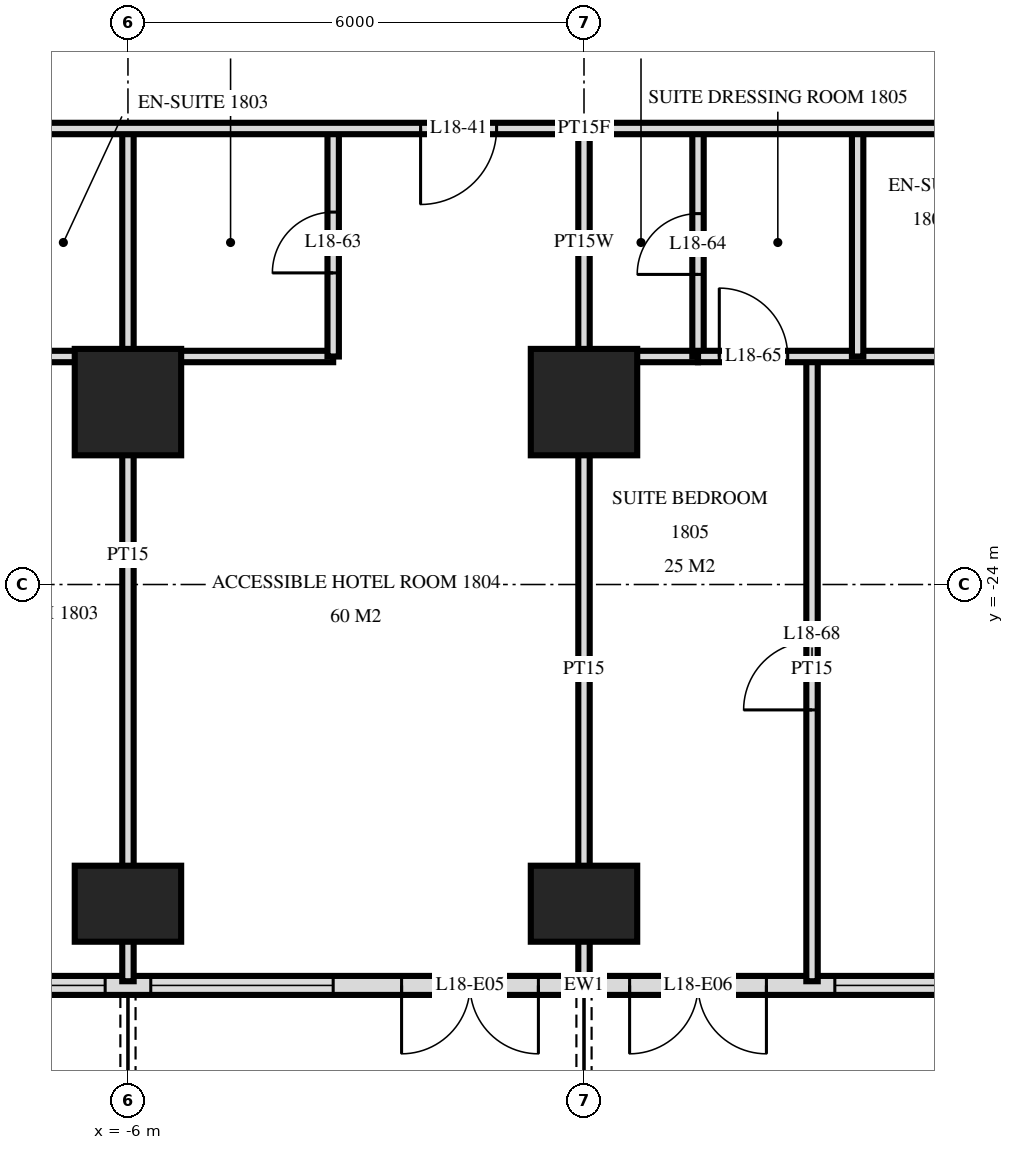
"""IFC4 building model, lengths in metres.
Left out: names, types, materials, properties, quantities, classifications, styles, units other than length and angle.
Written with IfcOpenShell. Run it as: python <this file> out.ifc"""

import sys

from ifc_helpers import new_model, si_unit, direction, frame, frame_2d, origin, origin_2d, place, context, subcontext, project, spatial, rectangle, extrude, element, fill, save


model = new_model("IFC4")
c1 = context("Model", 3, precision=1e-05, world=origin(), true_north=direction((0.0, 1.0)))
c2 = subcontext(c1, "Body", "Model", "MODEL_VIEW")
j1 = project(units=[si_unit("LENGTHUNIT", "METRE"), si_unit("PLANEANGLEUNIT", "RADIAN")], contexts=[c1])
p1 = place(None, origin())
s1 = spatial("IfcSite", under=j1, at=p1, CompositionType="ELEMENT")
p2 = place(p1, origin())
s2 = spatial("IfcBuilding", under=s1, at=p2, CompositionType="ELEMENT")
p3 = place(p2, frame((0.0, 0.0, 74.4)))
s3 = spatial("IfcBuildingStorey", under=s2, at=p3, CompositionType="ELEMENT", Elevation=74.4)
p4 = place(p3, frame((-6.0, -28.2, 0.0), z_axis=(0.0, 0.0, 1.0), x_axis=(1.0, 0.0, 0.0)))
e1 = element("IfcColumn", 1, at=p4, inside=s3, PredefinedType="COLUMN", context=c2, shape_type="SweptSolid", body=[
    extrude(rectangle(XDim=1.4, YDim=1.0, at=origin_2d()), origin(), (0.0, 0.0, 1.0), 3.6),
])
p5 = place(p3, frame((-6.0, -21.6, 0.0), z_axis=(0.0, 0.0, 1.0), x_axis=(1.0, 0.0, 0.0)))
e2 = element("IfcColumn", 2, at=p5, inside=s3, PredefinedType="COLUMN", context=c2, shape_type="SweptSolid", body=[
    extrude(rectangle(XDim=1.4, YDim=1.4, at=origin_2d()), origin(), (0.0, 0.0, 1.0), 3.6),
])
p6 = place(p3, frame((0.0, -28.2, 0.0), z_axis=(0.0, 0.0, 1.0), x_axis=(1.0, 0.0, 0.0)))
e3 = element("IfcColumn", 3, at=p6, inside=s3, PredefinedType="COLUMN", context=c2, shape_type="SweptSolid", body=[
    extrude(rectangle(XDim=1.4, YDim=1.0, at=origin_2d()), origin(), (0.0, 0.0, 1.0), 3.6),
])
p7 = place(p3, frame((0.0, -21.6, 0.0), z_axis=(0.0, 0.0, 1.0), x_axis=(1.0, 0.0, 0.0)))
e4 = element("IfcColumn", 4, at=p7, inside=s3, PredefinedType="COLUMN", context=c2, shape_type="SweptSolid", body=[
    extrude(rectangle(XDim=1.4, YDim=1.4, at=origin_2d()), origin(), (0.0, 0.0, 1.0), 3.6),
])
p8 = place(p3, frame((-28.775, -29.275, 0.0), z_axis=(0.0, 0.0, 1.0), x_axis=(1.0, 0.0, 0.0)))
e5 = element("IfcWall", 5, at=p8, inside=s3, PredefinedType="SOLIDWALL", context=c2, shape_type="SweptSolid", body=[
    extrude(rectangle(XDim=57.551, YDim=0.25, at=frame_2d((28.775, 0.0))), origin(), (0.0, 0.0, 1.0), 3.32),
])
p9 = place(p8, frame((0.575, 0.0, 0.0)))
e6 = element("IfcOpeningElement", 6, at=p9, cuts=e5, PredefinedType="OPENING", context=c2, shape_type="SweptSolid", body=[
    extrude(rectangle(XDim=1.8, YDim=2.4, at=frame_2d((0.9, 1.2))), frame((0.0, 0.135, 0.0), z_axis=(0.0, -1.0, 0.0), x_axis=(1.0, 0.0, 0.0)), (0.0, 0.0, 1.0), 0.27),
])
p10 = place(p8, frame((5.075, 0.0, 0.3)))
e7 = element("IfcOpeningElement", 7, at=p10, cuts=e5, PredefinedType="OPENING", context=c2, shape_type="SweptSolid", body=[
    extrude(rectangle(XDim=2.4, YDim=2.1, at=frame_2d((1.2, 1.05))), frame((0.0, 0.135, 0.0), z_axis=(0.0, -1.0, 0.0), x_axis=(1.0, 0.0, 0.0)), (0.0, 0.0, 1.0), 0.27),
])
p11 = place(p8, frame((8.375, 0.0, 0.0)))
e8 = element("IfcOpeningElement", 8, at=p11, cuts=e5, PredefinedType="OPENING", context=c2, shape_type="SweptSolid", body=[
    extrude(rectangle(XDim=1.8, YDim=2.4, at=frame_2d((0.9, 1.2))), frame((0.0, 0.135, 0.0), z_axis=(0.0, -1.0, 0.0), x_axis=(1.0, 0.0, 0.0)), (0.0, 0.0, 1.0), 0.27),
])
p12 = place(p8, frame((11.375, 0.0, 0.0)))
e9 = element("IfcOpeningElement", 9, at=p12, cuts=e5, PredefinedType="OPENING", context=c2, shape_type="SweptSolid", body=[
    extrude(rectangle(XDim=1.8, YDim=2.4, at=frame_2d((0.9, 1.2))), frame((0.0, 0.135, 0.0), z_axis=(0.0, -1.0, 0.0), x_axis=(1.0, 0.0, 0.0)), (0.0, 0.0, 1.0), 0.27),
])
p13 = place(p8, frame((14.075, 0.0, 0.3)))
e10 = element("IfcOpeningElement", 10, at=p13, cuts=e5, PredefinedType="OPENING", context=c2, shape_type="SweptSolid", body=[
    extrude(rectangle(XDim=2.4, YDim=2.1, at=frame_2d((1.2, 1.05))), frame((0.0, 0.135, 0.0), z_axis=(0.0, -1.0, 0.0), x_axis=(1.0, 0.0, 0.0)), (0.0, 0.0, 1.0), 0.27),
])
p14 = place(p8, frame((17.375, 0.0, 0.0)))
e11 = element("IfcOpeningElement", 11, at=p14, cuts=e5, PredefinedType="OPENING", context=c2, shape_type="SweptSolid", body=[
    extrude(rectangle(XDim=1.8, YDim=2.4, at=frame_2d((0.9, 1.2))), frame((0.0, 0.135, 0.0), z_axis=(0.0, -1.0, 0.0), x_axis=(1.0, 0.0, 0.0)), (0.0, 0.0, 1.0), 0.27),
])
p15 = place(p8, frame((20.075, 0.0, 0.3)))
e12 = element("IfcOpeningElement", 12, at=p15, cuts=e5, PredefinedType="OPENING", context=c2, shape_type="SweptSolid", body=[
    extrude(rectangle(XDim=2.4, YDim=2.1, at=frame_2d((1.2, 1.05))), frame((0.0, 0.135, 0.0), z_axis=(0.0, -1.0, 0.0), x_axis=(1.0, 0.0, 0.0)), (0.0, 0.0, 1.0), 0.27),
])
p16 = place(p8, frame((23.075, 0.0, 0.3)))
e13 = element("IfcOpeningElement", 13, at=p16, cuts=e5, PredefinedType="OPENING", context=c2, shape_type="SweptSolid", body=[
    extrude(rectangle(XDim=2.4, YDim=2.1, at=frame_2d((1.2, 1.05))), frame((0.0, 0.135, 0.0), z_axis=(0.0, -1.0, 0.0), x_axis=(1.0, 0.0, 0.0)), (0.0, 0.0, 1.0), 0.27),
])
p17 = place(p8, frame((26.375, 0.0, 0.0)))
e14 = element("IfcOpeningElement", 14, at=p17, cuts=e5, PredefinedType="OPENING", context=c2, shape_type="SweptSolid", body=[
    extrude(rectangle(XDim=1.8, YDim=2.4, at=frame_2d((0.9, 1.2))), frame((0.0, 0.135, 0.0), z_axis=(0.0, -1.0, 0.0), x_axis=(1.0, 0.0, 0.0)), (0.0, 0.0, 1.0), 0.27),
])
p18 = place(p8, frame((29.375, 0.0, 0.0)))
e15 = element("IfcOpeningElement", 15, at=p18, cuts=e5, PredefinedType="OPENING", context=c2, shape_type="SweptSolid", body=[
    extrude(rectangle(XDim=1.8, YDim=2.4, at=frame_2d((0.9, 1.2))), frame((0.0, 0.135, 0.0), z_axis=(0.0, -1.0, 0.0), x_axis=(1.0, 0.0, 0.0)), (0.0, 0.0, 1.0), 0.27),
])
p19 = place(p8, frame((32.075, 0.0, 0.3)))
e16 = element("IfcOpeningElement", 16, at=p19, cuts=e5, PredefinedType="OPENING", context=c2, shape_type="SweptSolid", body=[
    extrude(rectangle(XDim=2.4, YDim=2.1, at=frame_2d((1.2, 1.05))), frame((0.0, 0.135, 0.0), z_axis=(0.0, -1.0, 0.0), x_axis=(1.0, 0.0, 0.0)), (0.0, 0.0, 1.0), 0.27),
])
p20 = place(p8, frame((35.375, 0.0, 0.0)))
e17 = element("IfcOpeningElement", 17, at=p20, cuts=e5, PredefinedType="OPENING", context=c2, shape_type="SweptSolid", body=[
    extrude(rectangle(XDim=1.8, YDim=2.4, at=frame_2d((0.9, 1.2))), frame((0.0, 0.135, 0.0), z_axis=(0.0, -1.0, 0.0), x_axis=(1.0, 0.0, 0.0)), (0.0, 0.0, 1.0), 0.27),
])
p21 = place(p8, frame((38.075, 0.0, 0.3)))
e18 = element("IfcOpeningElement", 18, at=p21, cuts=e5, PredefinedType="OPENING", context=c2, shape_type="SweptSolid", body=[
    extrude(rectangle(XDim=2.4, YDim=2.1, at=frame_2d((1.2, 1.05))), frame((0.0, 0.135, 0.0), z_axis=(0.0, -1.0, 0.0), x_axis=(1.0, 0.0, 0.0)), (0.0, 0.0, 1.0), 0.27),
])
p22 = place(p8, frame((41.075, 0.0, 0.3)))
e19 = element("IfcOpeningElement", 19, at=p22, cuts=e5, PredefinedType="OPENING", context=c2, shape_type="SweptSolid", body=[
    extrude(rectangle(XDim=2.4, YDim=2.1, at=frame_2d((1.2, 1.05))), frame((0.0, 0.135, 0.0), z_axis=(0.0, -1.0, 0.0), x_axis=(1.0, 0.0, 0.0)), (0.0, 0.0, 1.0), 0.27),
])
p23 = place(p8, frame((44.375, 0.0, 0.0)))
e20 = element("IfcOpeningElement", 20, at=p23, cuts=e5, PredefinedType="OPENING", context=c2, shape_type="SweptSolid", body=[
    extrude(rectangle(XDim=1.8, YDim=2.4, at=frame_2d((0.9, 1.2))), frame((0.0, 0.135, 0.0), z_axis=(0.0, -1.0, 0.0), x_axis=(1.0, 0.0, 0.0)), (0.0, 0.0, 1.0), 0.27),
])
p24 = place(p8, frame((47.075, 0.0, 0.3)))
e21 = element("IfcOpeningElement", 21, at=p24, cuts=e5, PredefinedType="OPENING", context=c2, shape_type="SweptSolid", body=[
    extrude(rectangle(XDim=2.4, YDim=2.1, at=frame_2d((1.2, 1.05))), frame((0.0, 0.135, 0.0), z_axis=(0.0, -1.0, 0.0), x_axis=(1.0, 0.0, 0.0)), (0.0, 0.0, 1.0), 0.27),
])
p25 = place(p8, frame((50.375, 0.0, 0.0)))
e22 = element("IfcOpeningElement", 22, at=p25, cuts=e5, PredefinedType="OPENING", context=c2, shape_type="SweptSolid", body=[
    extrude(rectangle(XDim=1.8, YDim=2.4, at=frame_2d((0.9, 1.2))), frame((0.0, 0.135, 0.0), z_axis=(0.0, -1.0, 0.0), x_axis=(1.0, 0.0, 0.0)), (0.0, 0.0, 1.0), 0.27),
])
p26 = place(p8, frame((53.375, 0.0, 0.0)))
e23 = element("IfcOpeningElement", 23, at=p26, cuts=e5, PredefinedType="OPENING", context=c2, shape_type="SweptSolid", body=[
    extrude(rectangle(XDim=1.8, YDim=2.4, at=frame_2d((0.9, 1.2))), frame((0.0, 0.135, 0.0), z_axis=(0.0, -1.0, 0.0), x_axis=(1.0, 0.0, 0.0)), (0.0, 0.0, 1.0), 0.27),
])
p27 = place(p3, frame((3.6, -21.0, 0.0), z_axis=(0.0, 0.0, 1.0), x_axis=(0.0, 1.0, 0.0)))
e24 = element("IfcWall", 24, at=p27, inside=s3, PredefinedType="PARTITIONING", context=c2, shape_type="SweptSolid", body=[
    extrude(rectangle(XDim=3.0, YDim=0.15, at=frame_2d((1.5, 0.0))), origin(), (0.0, 0.0, 1.0), 3.32),
])
p28 = place(p3, frame((3.0, -29.22, 0.0), z_axis=(0.0, 0.0, 1.0), x_axis=(0.0, 1.0, 0.0)))
e25 = element("IfcWall", 25, at=p28, inside=s3, PredefinedType="PARTITIONING", context=c2, shape_type="SweptSolid", body=[
    extrude(rectangle(XDim=8.22, YDim=0.15, at=frame_2d((4.11, 0.0))), origin(), (0.0, 0.0, 1.0), 3.32),
])
p29 = place(p28, frame((3.57, 0.0, 0.0)))
e26 = element("IfcOpeningElement", 26, at=p29, cuts=e25, PredefinedType="OPENING", context=c2, shape_type="SweptSolid", body=[
    extrude(rectangle(XDim=0.9, YDim=2.1, at=frame_2d((0.45, 1.05))), frame((0.0, 0.085, 0.0), z_axis=(0.0, -1.0, 0.0), x_axis=(1.0, 0.0, 0.0)), (0.0, 0.0, 1.0), 0.17),
])
p30 = place(p3, frame((1.5, -21.0, 0.0), z_axis=(0.0, 0.0, 1.0), x_axis=(0.0, 1.0, 0.0)))
e27 = element("IfcWall", 27, at=p30, inside=s3, PredefinedType="PLUMBINGWALL", context=c2, shape_type="SweptSolid", body=[
    extrude(rectangle(XDim=3.0, YDim=0.15, at=frame_2d((1.5, 0.0))), origin(), (0.0, 0.0, 1.0), 3.32),
])
p31 = place(p30, frame((1.08, 0.0, 0.0)))
e28 = element("IfcOpeningElement", 28, at=p31, cuts=e27, PredefinedType="OPENING", context=c2, shape_type="SweptSolid", body=[
    extrude(rectangle(XDim=0.8, YDim=2.1, at=frame_2d((0.4, 1.05))), frame((0.0, 0.085, 0.0), z_axis=(0.0, -1.0, 0.0), x_axis=(1.0, 0.0, 0.0)), (0.0, 0.0, 1.0), 0.17),
])
p32 = place(p3, frame((0.0, -29.22, 0.0), z_axis=(0.0, 0.0, 1.0), x_axis=(0.0, 1.0, 0.0)))
e29 = element("IfcWall", 29, at=p32, inside=s3, PredefinedType="PARTITIONING", context=c2, shape_type="SweptSolid", body=[
    extrude(rectangle(XDim=8.22, YDim=0.15, at=frame_2d((4.11, 0.0))), origin(), (0.0, 0.0, 1.0), 3.32),
])
p33 = place(p3, frame((0.0, -21.0, 0.0), z_axis=(0.0, 0.0, 1.0), x_axis=(0.0, 1.0, 0.0)))
e30 = element("IfcWall", 30, at=p33, inside=s3, PredefinedType="PLUMBINGWALL", context=c2, shape_type="SweptSolid", body=[
    extrude(rectangle(XDim=3.0, YDim=0.15, at=frame_2d((1.5, 0.0))), origin(), (0.0, 0.0, 1.0), 3.32),
])
p34 = place(p3, frame((-3.3, -21.0, 0.0), z_axis=(0.0, 0.0, 1.0), x_axis=(0.0, 1.0, 0.0)))
e31 = element("IfcWall", 31, at=p34, inside=s3, PredefinedType="PARTITIONING", context=c2, shape_type="SweptSolid", body=[
    extrude(rectangle(XDim=3.0, YDim=0.15, at=frame_2d((1.5, 0.0))), origin(), (0.0, 0.0, 1.0), 3.32),
])
p35 = place(p34, frame((1.1, 0.0, 0.0)))
e32 = element("IfcOpeningElement", 32, at=p35, cuts=e31, PredefinedType="OPENING", context=c2, shape_type="SweptSolid", body=[
    extrude(rectangle(XDim=0.8, YDim=2.1, at=frame_2d((0.4, 1.05))), frame((0.0, 0.085, 0.0), z_axis=(0.0, -1.0, 0.0), x_axis=(1.0, 0.0, 0.0)), (0.0, 0.0, 1.0), 0.17),
])
p36 = place(p3, frame((-6.0, -29.22, 0.0), z_axis=(0.0, 0.0, 1.0), x_axis=(0.0, 1.0, 0.0)))
e33 = element("IfcWall", 33, at=p36, inside=s3, PredefinedType="PARTITIONING", context=c2, shape_type="SweptSolid", body=[
    extrude(rectangle(XDim=11.22, YDim=0.15, at=frame_2d((5.61, 0.0))), origin(), (0.0, 0.0, 1.0), 3.32),
])
p37 = place(p3, frame((-7.7, -21.0, 0.0), z_axis=(0.0, 0.0, 1.0), x_axis=(1.0, 0.0, 0.0)))
e34 = element("IfcWall", 34, at=p37, inside=s3, PredefinedType="PARTITIONING", context=c2, shape_type="SweptSolid", body=[
    extrude(rectangle(XDim=4.4, YDim=0.15, at=frame_2d((2.2, 0.0))), origin(), (0.0, 0.0, 1.0), 3.32),
])
p38 = place(p3, frame((1.5, -21.0, 0.0), z_axis=(0.0, 0.0, 1.0), x_axis=(1.0, 0.0, 0.0)))
e35 = element("IfcWall", 35, at=p38, inside=s3, PredefinedType="PARTITIONING", context=c2, shape_type="SweptSolid", body=[
    extrude(rectangle(XDim=5.1, YDim=0.15, at=frame_2d((2.55, 0.0))), origin(), (0.0, 0.0, 1.0), 3.32),
])
p39 = place(p38, frame((0.28, 0.0, 0.0)))
e36 = element("IfcOpeningElement", 36, at=p39, cuts=e35, PredefinedType="OPENING", context=c2, shape_type="SweptSolid", body=[
    extrude(rectangle(XDim=0.9, YDim=2.1, at=frame_2d((0.45, 1.05))), frame((0.0, 0.085, 0.0), z_axis=(0.0, -1.0, 0.0), x_axis=(1.0, 0.0, 0.0)), (0.0, 0.0, 1.0), 0.17),
])
p40 = place(p3, frame((0.0, -21.0, 0.0), z_axis=(0.0, 0.0, 1.0), x_axis=(1.0, 0.0, 0.0)))
e37 = element("IfcWall", 37, at=p40, inside=s3, PredefinedType="PLUMBINGWALL", context=c2, shape_type="SweptSolid", body=[
    extrude(rectangle(XDim=1.5, YDim=0.15, at=frame_2d((0.75, 0.0))), origin(), (0.0, 0.0, 1.0), 3.32),
])
p41 = place(p3, frame((-33.12, -18.0, 0.0), z_axis=(0.0, 0.0, 1.0), x_axis=(1.0, 0.0, 0.0)))
e38 = element("IfcWall", 38, at=p41, inside=s3, PredefinedType="PARTITIONING", context=c2, shape_type="SweptSolid", body=[
    extrude(rectangle(XDim=66.24, YDim=0.15, at=frame_2d((33.12, 0.0))), origin(), (0.0, 0.0, 1.0), 3.32),
])
p42 = place(p41, frame((15.27, 0.0, 0.0)))
e39 = element("IfcOpeningElement", 39, at=p42, cuts=e38, PredefinedType="OPENING", context=c2, shape_type="SweptSolid", body=[
    extrude(rectangle(XDim=1.0, YDim=2.1, at=frame_2d((0.5, 1.05))), frame((0.0, 0.085, 0.0), z_axis=(0.0, -1.0, 0.0), x_axis=(1.0, 0.0, 0.0)), (0.0, 0.0, 1.0), 0.17),
])
p43 = place(p41, frame((21.22, 0.0, 0.0)))
e40 = element("IfcOpeningElement", 40, at=p43, cuts=e38, PredefinedType="OPENING", context=c2, shape_type="SweptSolid", body=[
    extrude(rectangle(XDim=1.0, YDim=2.1, at=frame_2d((0.5, 1.05))), frame((0.0, 0.085, 0.0), z_axis=(0.0, -1.0, 0.0), x_axis=(1.0, 0.0, 0.0)), (0.0, 0.0, 1.0), 0.17),
])
p44 = place(p41, frame((24.27, 0.0, 0.0)))
e41 = element("IfcOpeningElement", 41, at=p44, cuts=e38, PredefinedType="OPENING", context=c2, shape_type="SweptSolid", body=[
    extrude(rectangle(XDim=1.0, YDim=2.1, at=frame_2d((0.5, 1.05))), frame((0.0, 0.085, 0.0), z_axis=(0.0, -1.0, 0.0), x_axis=(1.0, 0.0, 0.0)), (0.0, 0.0, 1.0), 0.17),
])
p45 = place(p41, frame((30.97, 0.0, 0.0)))
e42 = element("IfcOpeningElement", 42, at=p45, cuts=e38, PredefinedType="OPENING", context=c2, shape_type="SweptSolid", body=[
    extrude(rectangle(XDim=1.0, YDim=2.1, at=frame_2d((0.5, 1.05))), frame((0.0, 0.085, 0.0), z_axis=(0.0, -1.0, 0.0), x_axis=(1.0, 0.0, 0.0)), (0.0, 0.0, 1.0), 0.17),
])
p46 = place(p41, frame((40.42, 0.0, 0.0)))
e43 = element("IfcOpeningElement", 43, at=p46, cuts=e38, PredefinedType="OPENING", context=c2, shape_type="SweptSolid", body=[
    extrude(rectangle(XDim=1.0, YDim=2.1, at=frame_2d((0.5, 1.05))), frame((0.0, 0.085, 0.0), z_axis=(0.0, -1.0, 0.0), x_axis=(1.0, 0.0, 0.0)), (0.0, 0.0, 1.0), 0.17),
])
p47 = place(p41, frame((43.97, 0.0, 0.0)))
e44 = element("IfcOpeningElement", 44, at=p47, cuts=e38, PredefinedType="OPENING", context=c2, shape_type="SweptSolid", body=[
    extrude(rectangle(XDim=1.0, YDim=2.1, at=frame_2d((0.5, 1.05))), frame((0.0, 0.085, 0.0), z_axis=(0.0, -1.0, 0.0), x_axis=(1.0, 0.0, 0.0)), (0.0, 0.0, 1.0), 0.17),
])
p48 = place(p41, frame((45.52, 0.0, 0.0)))
e45 = element("IfcOpeningElement", 45, at=p48, cuts=e38, PredefinedType="OPENING", context=c2, shape_type="SweptSolid", body=[
    extrude(rectangle(XDim=1.0, YDim=2.1, at=frame_2d((0.5, 1.05))), frame((0.0, 0.085, 0.0), z_axis=(0.0, -1.0, 0.0), x_axis=(1.0, 0.0, 0.0)), (0.0, 0.0, 1.0), 0.17),
])
p49 = place(p41, frame((52.97, 0.0, 0.0)))
e46 = element("IfcOpeningElement", 46, at=p49, cuts=e38, PredefinedType="OPENING", context=c2, shape_type="SweptSolid", body=[
    extrude(rectangle(XDim=1.0, YDim=2.1, at=frame_2d((0.5, 1.05))), frame((0.0, 0.085, 0.0), z_axis=(0.0, -1.0, 0.0), x_axis=(1.0, 0.0, 0.0)), (0.0, 0.0, 1.0), 0.17),
])
p50 = place(p41, frame((54.27, 0.0, 0.0)))
e47 = element("IfcOpeningElement", 47, at=p50, cuts=e38, PredefinedType="OPENING", context=c2, shape_type="SweptSolid", body=[
    extrude(rectangle(XDim=1.0, YDim=2.1, at=frame_2d((0.5, 1.05))), frame((0.0, 0.085, 0.0), z_axis=(0.0, -1.0, 0.0), x_axis=(1.0, 0.0, 0.0)), (0.0, 0.0, 1.0), 0.17),
])
p51 = place(p41, frame((13.42, 0.0, 0.0)))
e48 = element("IfcOpeningElement", 48, at=p51, cuts=e38, PredefinedType="OPENING", context=c2, shape_type="SweptSolid", body=[
    extrude(rectangle(XDim=1.0, YDim=2.1, at=frame_2d((0.5, 1.05))), frame((0.0, 0.085, 0.0), z_axis=(0.0, -1.0, 0.0), x_axis=(1.0, 0.0, 0.0)), (0.0, 0.0, 1.0), 0.17),
])
p52 = place(p41, frame((60.82, 0.0, 0.0)))
e49 = element("IfcOpeningElement", 49, at=p52, cuts=e38, PredefinedType="OPENING", context=c2, shape_type="SweptSolid", body=[
    extrude(rectangle(XDim=1.0, YDim=2.1, at=frame_2d((0.5, 1.05))), frame((0.0, 0.085, 0.0), z_axis=(0.0, -1.0, 0.0), x_axis=(1.0, 0.0, 0.0)), (0.0, 0.0, 1.0), 0.17),
])
p53 = place(p15, origin())
e50 = element("IfcWindow", 50, at=p53, inside=s3, PartitioningType="SINGLE_PANEL", PredefinedType="WINDOW", context=c2, shape_type="SweptSolid", body=[
    extrude(rectangle(XDim=2.4, YDim=2.1, at=frame_2d((1.2, 1.05))), frame((0.0, 0.03, 0.0), z_axis=(0.0, -1.0, 0.0), x_axis=(1.0, 0.0, 0.0)), (0.0, 0.0, 1.0), 0.06),
])
fill(e12, e50)
p54 = place(p16, origin())
e51 = element("IfcWindow", 51, at=p54, inside=s3, PartitioningType="SINGLE_PANEL", PredefinedType="WINDOW", context=c2, shape_type="SweptSolid", body=[
    extrude(rectangle(XDim=2.4, YDim=2.1, at=frame_2d((1.2, 1.05))), frame((0.0, 0.03, 0.0), z_axis=(0.0, -1.0, 0.0), x_axis=(1.0, 0.0, 0.0)), (0.0, 0.0, 1.0), 0.06),
])
fill(e13, e51)
p55 = place(p17, frame((0.9, 0.0, 0.0), z_axis=(0.0, 0.0, 1.0), x_axis=(-1.0, 0.0, 0.0)))
e52 = element("IfcDoor", 52, at=p55, inside=s3, OperationType="DOUBLE_DOOR_SINGLE_SWING", PredefinedType="DOOR", context=c2, shape_type="SweptSolid", body=[
    extrude(rectangle(XDim=1.8, YDim=2.4, at=frame_2d((0.0, 1.2))), frame((0.0, -0.025, 0.0), z_axis=(0.0, 1.0, 0.0), x_axis=(-1.0, 0.0, 0.0)), (0.0, 0.0, 1.0), 0.05),
])
fill(e14, e52)
p56 = place(p18, frame((0.9, 0.0, 0.0), z_axis=(0.0, 0.0, 1.0), x_axis=(-1.0, 0.0, 0.0)))
e53 = element("IfcDoor", 53, at=p56, inside=s3, OperationType="DOUBLE_DOOR_SINGLE_SWING", PredefinedType="DOOR", context=c2, shape_type="SweptSolid", body=[
    extrude(rectangle(XDim=1.8, YDim=2.4, at=frame_2d((0.0, 1.2))), frame((0.0, -0.025, 0.0), z_axis=(0.0, 1.0, 0.0), x_axis=(-1.0, 0.0, 0.0)), (0.0, 0.0, 1.0), 0.05),
])
fill(e15, e53)
p57 = place(p19, origin())
e54 = element("IfcWindow", 54, at=p57, inside=s3, PartitioningType="SINGLE_PANEL", PredefinedType="WINDOW", context=c2, shape_type="SweptSolid", body=[
    extrude(rectangle(XDim=2.4, YDim=2.1, at=frame_2d((1.2, 1.05))), frame((0.0, 0.03, 0.0), z_axis=(0.0, -1.0, 0.0), x_axis=(1.0, 0.0, 0.0)), (0.0, 0.0, 1.0), 0.06),
])
fill(e16, e54)
p58 = place(p45, frame((0.5, 0.0, 0.0), z_axis=(0.0, 0.0, 1.0), x_axis=(-1.0, 0.0, 0.0)))
e55 = element("IfcDoor", 55, at=p58, inside=s3, OperationType="SINGLE_SWING_LEFT", PredefinedType="DOOR", context=c2, shape_type="SweptSolid", body=[
    extrude(rectangle(XDim=1.0, YDim=2.1, at=frame_2d((0.0, 1.05))), frame((0.0, -0.025, 0.0), z_axis=(0.0, 1.0, 0.0), x_axis=(-1.0, 0.0, 0.0)), (0.0, 0.0, 1.0), 0.05),
])
fill(e42, e55)
p59 = place(p35, origin())
e56 = element("IfcDoor", 56, at=p59, inside=s3, OperationType="SINGLE_SWING_RIGHT", PredefinedType="DOOR", context=c2, shape_type="SweptSolid", body=[
    extrude(rectangle(XDim=0.8, YDim=2.1, at=frame_2d((0.4, 1.05))), frame((0.0, 0.025, 0.0), z_axis=(0.0, -1.0, 0.0), x_axis=(1.0, 0.0, 0.0)), (0.0, 0.0, 1.0), 0.05),
])
fill(e32, e56)
p60 = place(p31, origin())
e57 = element("IfcDoor", 57, at=p60, inside=s3, OperationType="SINGLE_SWING_RIGHT", PredefinedType="DOOR", context=c2, shape_type="SweptSolid", body=[
    extrude(rectangle(XDim=0.8, YDim=2.1, at=frame_2d((0.4, 1.05))), frame((0.0, 0.025, 0.0), z_axis=(0.0, -1.0, 0.0), x_axis=(1.0, 0.0, 0.0)), (0.0, 0.0, 1.0), 0.05),
])
fill(e28, e57)
p61 = place(p39, origin())
e58 = element("IfcDoor", 58, at=p61, inside=s3, OperationType="SINGLE_SWING_RIGHT", PredefinedType="DOOR", context=c2, shape_type="SweptSolid", body=[
    extrude(rectangle(XDim=0.9, YDim=2.1, at=frame_2d((0.45, 1.05))), frame((0.0, 0.025, 0.0), z_axis=(0.0, -1.0, 0.0), x_axis=(1.0, 0.0, 0.0)), (0.0, 0.0, 1.0), 0.05),
])
fill(e36, e58)
p62 = place(p29, origin())
e59 = element("IfcDoor", 59, at=p62, inside=s3, OperationType="SINGLE_SWING_RIGHT", PredefinedType="DOOR", context=c2, shape_type="SweptSolid", body=[
    extrude(rectangle(XDim=0.9, YDim=2.1, at=frame_2d((0.45, 1.05))), frame((0.0, 0.025, 0.0), z_axis=(0.0, -1.0, 0.0), x_axis=(1.0, 0.0, 0.0)), (0.0, 0.0, 1.0), 0.05),
])
fill(e26, e59)
save(model, sys.argv[1])
